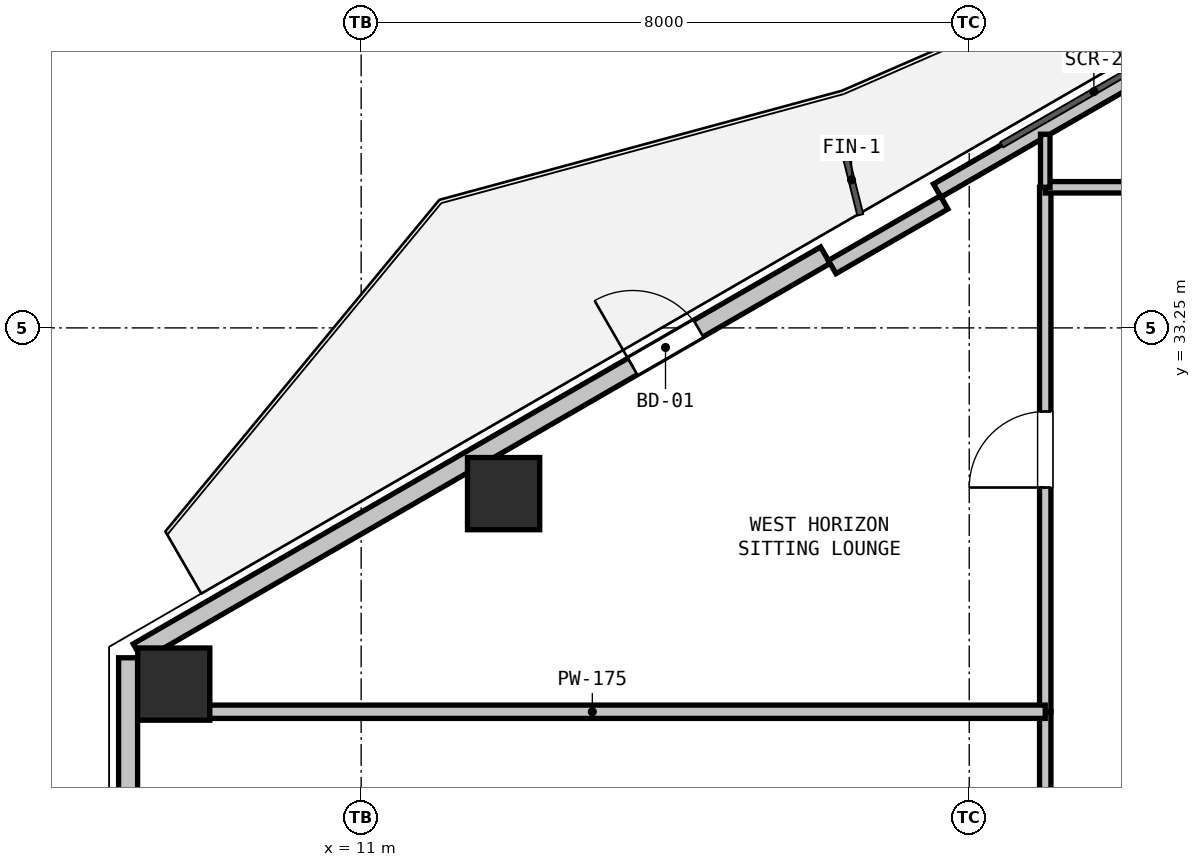
"""IFC4 building model, lengths in metres.
Left out: names, types, materials, properties, quantities, classifications, styles, units other than length and angle.
Written with IfcOpenShell. Run it as: python <this file> out.ifc"""

import sys

from ifc_helpers import new_model, si_unit, direction, frame, frame_2d, origin, origin_2d, place, context, subcontext, project, spatial, rectangle, hollow_rectangle, extrude, element, fill, save


model = new_model("IFC4")
c1 = context("Model", 3, precision=1e-05, world=origin(), true_north=direction((0.0, 1.0)))
c2 = subcontext(c1, "Body", "Model", "MODEL_VIEW")
j1 = project(units=[si_unit("LENGTHUNIT", "METRE"), si_unit("PLANEANGLEUNIT", "RADIAN")], contexts=[c1])
p1 = place(None, origin())
s1 = spatial("IfcSite", under=j1, at=p1, CompositionType="ELEMENT")
p2 = place(p1, origin())
s2 = spatial("IfcBuilding", under=s1, at=p2, CompositionType="ELEMENT")
p3 = place(p2, frame((0.0, 0.0, 170.7)))
s3 = spatial("IfcBuildingStorey", under=s2, at=p3, CompositionType="ELEMENT", Elevation=170.7)
for number, where, z_axis, x_axis in (
    (1, (8.534, 28.564, 0.0), (0.0, 0.0, 1.0), (1.0, 0.0, 0.0)),
    (2, (12.874, 31.07, 0.0), (0.0, 0.0, 1.0), (1.0, 0.0, 0.0)),
):
    element("IfcColumn", number, at=place(p3, frame(where, z_axis=z_axis, x_axis=x_axis)), inside=s3, PredefinedType="COLUMN", context=c2, shape_type="SweptSolid", body=[
        extrude(hollow_rectangle(XDim=0.95, YDim=0.95, WallThickness=0.028, at=origin_2d()), origin(), (0.0, 0.0, 1.0), 3.22),
    ])
p4 = place(p3, frame((7.934, 24.59, 0.0), z_axis=(0.0, 0.0, 1.0), x_axis=(0.0, 1.0, 0.0)))
e3 = element("IfcWall", 3, at=p4, inside=s3, PredefinedType="SOLIDWALL", context=c2, shape_type="SweptSolid", body=[
    extrude(rectangle(XDim=4.32, YDim=0.25, at=frame_2d((2.16, 0.0))), origin(), (0.0, 0.0, 1.0), 4.19),
])
p5 = place(p3, frame((8.064, 28.985, 0.0), z_axis=(0.0, 0.0, 1.0), x_axis=(0.866027516296, 0.499996341005, 0.0)))
e4 = element("IfcWall", 4, at=p5, inside=s3, PredefinedType="SOLIDWALL", context=c2, shape_type="SweptSolid", body=[
    extrude(rectangle(XDim=10.442, YDim=0.25, at=frame_2d((5.221, 0.0))), origin(), (0.0, 0.0, 1.0), 4.19),
])
p6 = place(p5, frame((7.514, 0.0, 0.0)))
e5 = element("IfcOpeningElement", 5, at=p6, cuts=e4, PredefinedType="OPENING", context=c2, shape_type="SweptSolid", body=[
    extrude(rectangle(XDim=1.0, YDim=2.1, at=frame_2d((0.5, 1.05))), frame((0.0, 0.135, 0.0), z_axis=(0.0, -1.0, 0.0), x_axis=(1.0, 0.0, 0.0)), (0.0, 0.0, 1.0), 0.27),
])
p7 = place(p3, frame((18.58, 35.056, 0.0), z_axis=(0.0, 0.0, 1.0), x_axis=(0.866026169916, 0.499998673018, 0.0)))
e6 = element("IfcWall", 6, at=p7, inside=s3, PredefinedType="PARAPET", context=c2, shape_type="SweptSolid", body=[
    extrude(rectangle(XDim=9.742, YDim=0.2, at=frame_2d((4.871, 0.0))), origin(), (0.0, 0.0, 1.0), 0.2),
])
p8 = place(p3, frame((17.197, 34.051, 0.0), z_axis=(0.0, 0.0, 1.0), x_axis=(0.86605165483, 0.499954529098, 0.0)))
e7 = element("IfcWall", 7, at=p8, inside=s3, PredefinedType="PARAPET", context=c2, shape_type="SweptSolid", body=[
    extrude(rectangle(XDim=1.7, YDim=0.2, at=frame_2d((0.85, 0.0))), origin(), (0.0, 0.0, 1.0), 4.19),
])
p9 = place(p3, frame((20.0, 24.2, 0.0), z_axis=(0.0, 0.0, 1.0), x_axis=(0.0, 1.0, 0.0)))
e8 = element("IfcWall", 8, at=p9, inside=s3, PredefinedType="PARTITIONING", context=c2, shape_type="SweptSolid", body=[
    extrude(rectangle(XDim=4.0, YDim=0.15, at=frame_2d((2.0, 0.0))), origin(), (0.0, 0.0, 1.0), 3.205),
])
p10 = place(p9, frame((1.575, 0.0, 0.0)))
e9 = element("IfcOpeningElement", 9, at=p10, cuts=e8, PredefinedType="OPENING", context=c2, shape_type="SweptSolid", body=[
    extrude(rectangle(XDim=0.85, YDim=2.1, at=frame_2d((0.425, 1.05))), frame((0.0, 0.085, 0.0), z_axis=(0.0, -1.0, 0.0), x_axis=(1.0, 0.0, 0.0)), (0.0, 0.0, 1.0), 0.17),
])
p11 = place(p3, frame((20.0, 28.2, 0.0), z_axis=(0.0, 0.0, 1.0), x_axis=(0.0, 1.0, 0.0)))
e10 = element("IfcWall", 10, at=p11, inside=s3, PredefinedType="PARTITIONING", context=c2, shape_type="SweptSolid", body=[
    extrude(rectangle(XDim=6.9, YDim=0.15, at=frame_2d((3.45, 0.0))), origin(), (0.0, 0.0, 1.0), 2.365),
])
p12 = place(p11, frame((2.95, 0.0, 0.0)))
e11 = element("IfcOpeningElement", 11, at=p12, cuts=e10, PredefinedType="OPENING", context=c2, shape_type="SweptSolid", body=[
    extrude(rectangle(XDim=1.0, YDim=2.15, at=frame_2d((0.5, 1.075))), frame((0.0, 0.085, 0.0), z_axis=(0.0, -1.0, 0.0), x_axis=(1.0, 0.0, 0.0)), (0.0, 0.0, 1.0), 0.17),
])
p13 = place(p3, frame((20.0, 35.1, 0.0), z_axis=(0.0, 0.0, 1.0), x_axis=(1.0, 0.0, 0.0)))
e12 = element("IfcWall", 12, at=p13, inside=s3, PredefinedType="PARTITIONING", context=c2, shape_type="SweptSolid", body=[
    extrude(rectangle(XDim=9.5, YDim=0.15, at=frame_2d((4.75, 0.0))), origin(), (0.0, 0.0, 1.0), 2.365),
])
p14 = place(p13, frame((3.85, 0.0, 0.0)))
e13 = element("IfcOpeningElement", 13, at=p14, cuts=e12, PredefinedType="OPENING", context=c2, shape_type="SweptSolid", body=[
    extrude(rectangle(XDim=1.8, YDim=2.2, at=frame_2d((0.9, 1.1))), frame((0.0, 0.085, 0.0), z_axis=(0.0, -1.0, 0.0), x_axis=(1.0, 0.0, 0.0)), (0.0, 0.0, 1.0), 0.17),
])
p15 = place(p3, frame((8.083, 28.2, 0.0), z_axis=(0.0, 0.0, 1.0), x_axis=(1.0, 0.0, 0.0)))
e14 = element("IfcWall", 14, at=p15, inside=s3, PredefinedType="PLUMBINGWALL", context=c2, shape_type="SweptSolid", body=[
    extrude(rectangle(XDim=11.917, YDim=0.175, at=frame_2d((5.958, 0.0))), origin(), (0.0, 0.0, 1.0), 3.205),
])
p16 = place(p3, frame((20.0, 35.1, 0.0), z_axis=(0.0, 0.0, 1.0), x_axis=(0.0, 1.0, 0.0)))
e15 = element("IfcWall", 15, at=p16, inside=s3, PredefinedType="PARTITIONING", context=c2, shape_type="SweptSolid", body=[
    extrude(rectangle(XDim=0.698, YDim=0.125, at=frame_2d((0.349, 0.0))), origin(), (0.0, 0.0, 1.0), 2.365),
])
p17 = place(p6, origin())
e16 = element("IfcDoor", 16, at=p17, inside=s3, OperationType="SINGLE_SWING_LEFT", PredefinedType="DOOR", context=c2, shape_type="SweptSolid", body=[
    extrude(rectangle(XDim=1.0, YDim=2.1, at=frame_2d((0.5, 1.05))), frame((0.0, 0.025, 0.0), z_axis=(0.0, -1.0, 0.0), x_axis=(1.0, 0.0, 0.0)), (0.0, 0.0, 1.0), 0.05),
])
fill(e5, e16)
p18 = place(p12, origin())
e17 = element("IfcDoor", 17, at=p18, inside=s3, OperationType="SINGLE_SWING_LEFT", PredefinedType="DOOR", context=c2, shape_type="SweptSolid", body=[
    extrude(rectangle(XDim=1.0, YDim=2.15, at=frame_2d((0.5, 1.075))), frame((0.0, 0.025, 0.0), z_axis=(0.0, -1.0, 0.0), x_axis=(1.0, 0.0, 0.0)), (0.0, 0.0, 1.0), 0.05),
])
fill(e11, e17)
save(model, sys.argv[1])
